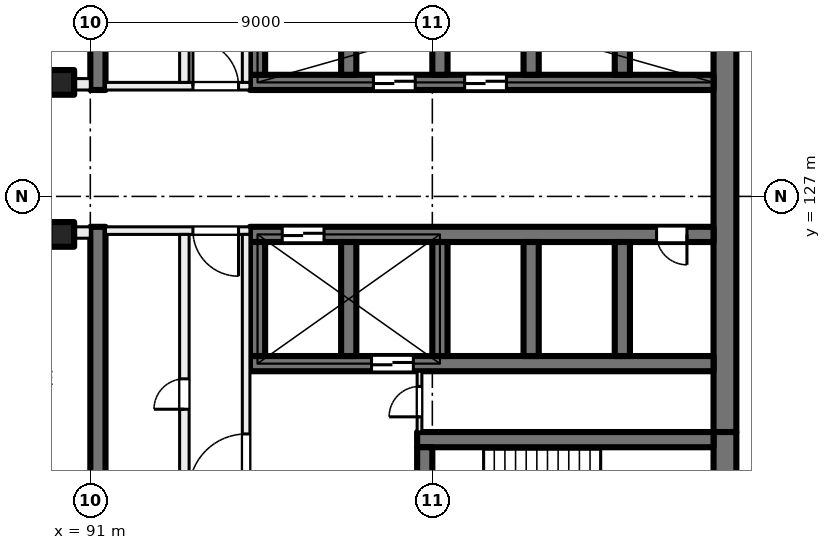
"""IFC4 building model, lengths in metres.
Left out: names, types, materials, properties, quantities, classifications, styles, units other than length and angle.
Written with IfcOpenShell. Run it as: python <this file> out.ifc"""

import sys

from ifc_helpers import new_model, si_unit, direction, frame, frame_2d, origin, origin_2d, place, context, subcontext, project, spatial, rectangle, extrude, element, fill, save


model = new_model("IFC4")
c1 = context("Model", 3, precision=1e-05, world=origin(), true_north=direction((0.0, 1.0)))
c2 = subcontext(c1, "Body", "Model", "MODEL_VIEW")
j1 = project(units=[si_unit("LENGTHUNIT", "METRE"), si_unit("PLANEANGLEUNIT", "RADIAN")], contexts=[c1])
p1 = place(None, origin())
s1 = spatial("IfcSite", under=j1, at=p1, CompositionType="ELEMENT")
p2 = place(p1, origin())
s2 = spatial("IfcBuilding", under=s1, at=p2, CompositionType="ELEMENT")
p3 = place(p2, frame((0.0, 0.0, 101.0)))
s3 = spatial("IfcBuildingStorey", under=s2, at=p3, CompositionType="ELEMENT", Elevation=101.0)
for number, where, z_axis, x_axis in (
    (1, (90.25, 130.0, 0.0), (0.0, 0.0, 1.0), (1.0, 0.0, 0.0)),
    (2, (90.25, 126.0, 0.0), (0.0, 0.0, 1.0), (1.0, 0.0, 0.0)),
):
    element("IfcColumn", number, at=place(p3, frame(where, z_axis=z_axis, x_axis=x_axis)), inside=s3, PredefinedType="COLUMN", context=c2, shape_type="SweptSolid", body=[
        extrude(rectangle(XDim=0.65, YDim=0.65, at=origin_2d()), origin(), (0.0, 0.0, 1.0), 4.0),
    ])
p4 = place(p3, frame((107.7, 135.2, 0.0), z_axis=(0.0, 0.0, 1.0), x_axis=(0.0, -1.0, 0.0)))
e3 = element("IfcWall", 3, at=p4, inside=s3, PredefinedType="SHEAR", context=c2, shape_type="SweptSolid", body=[
    extrude(rectangle(XDim=14.4, YDim=0.6, at=frame_2d((7.2, 0.0))), origin(), (0.0, 0.0, 1.0), 4.0),
])
p5 = place(p3, frame((107.7, 120.8, 0.0), z_axis=(0.0, 0.0, 1.0), x_axis=(0.0, -1.0, 0.0)))
e4 = element("IfcWall", 4, at=p5, inside=s3, PredefinedType="SHEAR", context=c2, shape_type="SweptSolid", body=[
    extrude(rectangle(XDim=3.8, YDim=0.6, at=frame_2d((1.9, 0.0))), origin(), (0.0, 0.0, 1.0), 4.0),
])
p6 = place(p3, frame((107.4, 120.6, 0.0), z_axis=(0.0, 0.0, 1.0), x_axis=(-1.0, 0.0, 0.0)))
e5 = element("IfcWall", 5, at=p6, inside=s3, PredefinedType="SHEAR", context=c2, shape_type="SweptSolid", body=[
    extrude(rectangle(XDim=7.8, YDim=0.4, at=frame_2d((3.9, 0.0))), origin(), (0.0, 0.0, 1.0), 4.0),
])
p7 = place(p3, frame((99.8, 120.4, 0.0), z_axis=(0.0, 0.0, 1.0), x_axis=(0.0, -1.0, 0.0)))
e6 = element("IfcWall", 6, at=p7, inside=s3, PredefinedType="SHEAR", context=c2, shape_type="SweptSolid", body=[
    extrude(rectangle(XDim=2.8, YDim=0.4, at=frame_2d((1.4, 0.0))), origin(), (0.0, 0.0, 1.0), 4.0),
])
p8 = place(p7, frame((0.9, 0.0, 0.0)))
e7 = element("IfcOpeningElement", 7, at=p8, cuts=e6, PredefinedType="OPENING", context=c2, shape_type="SweptSolid", body=[
    extrude(rectangle(XDim=1.0, YDim=2.1, at=frame_2d((0.5, 1.05))), frame((0.0, 0.21, 0.0), z_axis=(0.0, -1.0, 0.0), x_axis=(1.0, 0.0, 0.0)), (0.0, 0.0, 1.0), 0.42),
])
p9 = place(p3, frame((107.4, 130.0, 0.0), z_axis=(0.0, 0.0, 1.0), x_axis=(-1.0, 0.0, 0.0)))
e8 = element("IfcWall", 8, at=p9, inside=s3, PredefinedType="SHEAR", context=c2, shape_type="SweptSolid", body=[
    extrude(rectangle(XDim=12.2, YDim=0.4, at=frame_2d((6.1, 0.0))), origin(), (0.0, 0.0, 1.0), 4.0),
])
p10 = place(p9, frame((5.45, 0.0, 0.0)))
e9 = element("IfcOpeningElement", 9, at=p10, cuts=e8, PredefinedType="OPENING", context=c2, shape_type="SweptSolid", body=[
    extrude(rectangle(XDim=1.1, YDim=2.1, at=frame_2d((0.55, 1.05))), frame((0.0, 0.21, 0.0), z_axis=(0.0, -1.0, 0.0), x_axis=(1.0, 0.0, 0.0)), (0.0, 0.0, 1.0), 0.42),
])
p11 = place(p9, frame((7.85, 0.0, 0.0)))
e10 = element("IfcOpeningElement", 10, at=p11, cuts=e8, PredefinedType="OPENING", context=c2, shape_type="SweptSolid", body=[
    extrude(rectangle(XDim=1.1, YDim=2.1, at=frame_2d((0.55, 1.05))), frame((0.0, 0.21, 0.0), z_axis=(0.0, -1.0, 0.0), x_axis=(1.0, 0.0, 0.0)), (0.0, 0.0, 1.0), 0.42),
])
for number, where, z_axis, x_axis in (
    (11, (105.0, 133.2, 0.0), (0.0, 0.0, 1.0), (0.0, -1.0, 0.0)),
    (12, (102.6, 133.2, 0.0), (0.0, 0.0, 1.0), (0.0, -1.0, 0.0)),
    (13, (100.2, 133.2, 0.0), (0.0, 0.0, 1.0), (0.0, -1.0, 0.0)),
    (14, (97.8, 133.2, 0.0), (0.0, 0.0, 1.0), (0.0, -1.0, 0.0)),
    (15, (95.4, 133.2, 0.0), (0.0, 0.0, 1.0), (0.0, -1.0, 0.0)),
):
    element("IfcWall", number, at=place(p3, frame(where, z_axis=z_axis, x_axis=x_axis)), inside=s3, PredefinedType="SHEAR", context=c2, shape_type="SweptSolid", body=[
        extrude(rectangle(XDim=3.0, YDim=0.4, at=frame_2d((1.5, 0.0))), origin(), (0.0, 0.0, 1.0), 4.0),
    ])
p12 = place(p3, frame((107.4, 126.0, 0.0), z_axis=(0.0, 0.0, 1.0), x_axis=(-1.0, 0.0, 0.0)))
e16 = element("IfcWall", 16, at=p12, inside=s3, PredefinedType="SHEAR", context=c2, shape_type="SweptSolid", body=[
    extrude(rectangle(XDim=12.2, YDim=0.4, at=frame_2d((6.1, 0.0))), origin(), (0.0, 0.0, 1.0), 4.0),
])
p13 = place(p12, frame((10.25, 0.0, 0.0)))
e17 = element("IfcOpeningElement", 17, at=p13, cuts=e16, PredefinedType="OPENING", context=c2, shape_type="SweptSolid", body=[
    extrude(rectangle(XDim=1.1, YDim=2.1, at=frame_2d((0.55, 1.05))), frame((0.0, 0.21, 0.0), z_axis=(0.0, -1.0, 0.0), x_axis=(1.0, 0.0, 0.0)), (0.0, 0.0, 1.0), 0.42),
])
p14 = place(p12, frame((0.7, 0.0, 0.0)))
e18 = element("IfcOpeningElement", 18, at=p14, cuts=e16, PredefinedType="OPENING", context=c2, shape_type="SweptSolid", body=[
    extrude(rectangle(XDim=0.8, YDim=2.1, at=frame_2d((0.4, 1.05))), frame((0.0, 0.21, 0.0), z_axis=(0.0, -1.0, 0.0), x_axis=(1.0, 0.0, 0.0)), (0.0, 0.0, 1.0), 0.42),
])
p15 = place(p3, frame((107.4, 122.6, 0.0), z_axis=(0.0, 0.0, 1.0), x_axis=(-1.0, 0.0, 0.0)))
e19 = element("IfcWall", 19, at=p15, inside=s3, PredefinedType="SHEAR", context=c2, shape_type="SweptSolid", body=[
    extrude(rectangle(XDim=12.2, YDim=0.4, at=frame_2d((6.1, 0.0))), origin(), (0.0, 0.0, 1.0), 4.0),
])
p16 = place(p15, frame((7.9, 0.0, 0.0)))
e20 = element("IfcOpeningElement", 20, at=p16, cuts=e19, PredefinedType="OPENING", context=c2, shape_type="SweptSolid", body=[
    extrude(rectangle(XDim=1.1, YDim=2.1, at=frame_2d((0.55, 1.05))), frame((0.0, 0.21, 0.0), z_axis=(0.0, -1.0, 0.0), x_axis=(1.0, 0.0, 0.0)), (0.0, 0.0, 1.0), 0.42),
])
for number, where, z_axis, x_axis in (
    (21, (105.0, 125.8, 0.0), (0.0, 0.0, 1.0), (0.0, -1.0, 0.0)),
    (22, (102.6, 125.8, 0.0), (0.0, 0.0, 1.0), (0.0, -1.0, 0.0)),
    (23, (100.2, 125.8, 0.0), (0.0, 0.0, 1.0), (0.0, -1.0, 0.0)),
    (24, (97.8, 125.8, 0.0), (0.0, 0.0, 1.0), (0.0, -1.0, 0.0)),
    (25, (95.4, 125.8, 0.0), (0.0, 0.0, 1.0), (0.0, -1.0, 0.0)),
):
    element("IfcWall", number, at=place(p3, frame(where, z_axis=z_axis, x_axis=x_axis)), inside=s3, PredefinedType="SHEAR", context=c2, shape_type="SweptSolid", body=[
        extrude(rectangle(XDim=3.0, YDim=0.4, at=frame_2d((1.5, 0.0))), origin(), (0.0, 0.0, 1.0), 4.0),
    ])
for number, where, z_axis, x_axis in (
    (26, (91.2, 138.4, 0.0), (0.0, 0.0, 1.0), (0.0, -1.0, 0.0)),
    (27, (91.2, 126.2, 0.0), (0.0, 0.0, 1.0), (0.0, -1.0, 0.0)),
):
    element("IfcWall", number, at=place(p3, frame(where, z_axis=z_axis, x_axis=x_axis)), inside=s3, PredefinedType="SHEAR", context=c2, shape_type="SweptSolid", body=[
        extrude(rectangle(XDim=8.6, YDim=0.4, at=frame_2d((4.3, 0.0))), origin(), (0.0, 0.0, 1.0), 4.0),
    ])
p17 = place(p3, frame((95.2, 126.1, 0.0), z_axis=(0.0, 0.0, 1.0), x_axis=(-1.0, 0.0, 0.0)))
e28 = element("IfcWall", 28, at=p17, inside=s3, PredefinedType="PARTITIONING", context=c2, shape_type="SweptSolid", body=[
    extrude(rectangle(XDim=3.8, YDim=0.2, at=frame_2d((1.9, 0.0))), origin(), (0.0, 0.0, 1.0), 3.625),
])
p18 = place(p17, frame((0.3, 0.0, 0.0)))
e29 = element("IfcOpeningElement", 29, at=p18, cuts=e28, PredefinedType="OPENING", context=c2, shape_type="SweptSolid", body=[
    extrude(rectangle(XDim=1.2, YDim=2.1, at=frame_2d((0.6, 1.05))), frame((0.0, 0.11, 0.0), z_axis=(0.0, -1.0, 0.0), x_axis=(1.0, 0.0, 0.0)), (0.0, 0.0, 1.0), 0.22),
])
p19 = place(p3, frame((95.1, 117.6, 0.0), z_axis=(0.0, 0.0, 1.0), x_axis=(0.0, 1.0, 0.0)))
e30 = element("IfcWall", 30, at=p19, inside=s3, PredefinedType="PARTITIONING", context=c2, shape_type="SweptSolid", body=[
    extrude(rectangle(XDim=8.4, YDim=0.2, at=frame_2d((4.2, 0.0))), origin(), (0.0, 0.0, 1.0), 3.625),
])
p20 = place(p19, frame((1.65, 0.0, 0.0)))
e31 = element("IfcOpeningElement", 31, at=p20, cuts=e30, PredefinedType="OPENING", context=c2, shape_type="SweptSolid", body=[
    extrude(rectangle(XDim=1.5, YDim=2.1, at=frame_2d((0.75, 1.05))), frame((0.0, 0.11, 0.0), z_axis=(0.0, -1.0, 0.0), x_axis=(1.0, 0.0, 0.0)), (0.0, 0.0, 1.0), 0.22),
])
p21 = place(p3, frame((93.475, 117.6, 0.0), z_axis=(0.0, 0.0, 1.0), x_axis=(0.0, 1.0, 0.0)))
e32 = element("IfcWall", 32, at=p21, inside=s3, PredefinedType="PARTITIONING", context=c2, shape_type="SweptSolid", body=[
    extrude(rectangle(XDim=8.4, YDim=0.25, at=frame_2d((4.2, 0.0))), origin(), (0.0, 0.0, 1.0), 3.625),
])
p22 = place(p21, frame((3.8, 0.0, 0.0)))
e33 = element("IfcOpeningElement", 33, at=p22, cuts=e32, PredefinedType="OPENING", context=c2, shape_type="SweptSolid", body=[
    extrude(rectangle(XDim=0.8, YDim=2.1, at=frame_2d((0.4, 1.05))), frame((0.0, 0.135, 0.0), z_axis=(0.0, -1.0, 0.0), x_axis=(1.0, 0.0, 0.0)), (0.0, 0.0, 1.0), 0.27),
])
p23 = place(p3, frame((99.663, 120.8, 0.0), z_axis=(0.0, 0.0, 1.0), x_axis=(0.0, 1.0, 0.0)))
e34 = element("IfcWall", 34, at=p23, inside=s3, PredefinedType="PARTITIONING", context=c2, shape_type="SweptSolid", body=[
    extrude(rectangle(XDim=1.6, YDim=0.125, at=frame_2d((0.8, 0.0))), origin(), (0.0, 0.0, 1.0), 3.625),
])
p24 = place(p23, frame((0.4, 0.0, 0.0)))
e35 = element("IfcOpeningElement", 35, at=p24, cuts=e34, PredefinedType="OPENING", context=c2, shape_type="SweptSolid", body=[
    extrude(rectangle(XDim=0.8, YDim=2.1, at=frame_2d((0.4, 1.05))), frame((0.0, 0.073, 0.0), z_axis=(0.0, -1.0, 0.0), x_axis=(1.0, 0.0, 0.0)), (0.0, 0.0, 1.0), 0.145),
])
p25 = place(p3, frame((91.4, 129.9, 0.0), z_axis=(0.0, 0.0, 1.0), x_axis=(1.0, 0.0, 0.0)))
e36 = element("IfcWall", 36, at=p25, inside=s3, PredefinedType="PARTITIONING", context=c2, shape_type="SweptSolid", body=[
    extrude(rectangle(XDim=3.8, YDim=0.2, at=frame_2d((1.9, 0.0))), origin(), (0.0, 0.0, 1.0), 3.625),
])
p26 = place(p25, frame((2.3, 0.0, 0.0)))
e37 = element("IfcOpeningElement", 37, at=p26, cuts=e36, PredefinedType="OPENING", context=c2, shape_type="SweptSolid", body=[
    extrude(rectangle(XDim=1.2, YDim=2.1, at=frame_2d((0.6, 1.05))), frame((0.0, 0.11, 0.0), z_axis=(0.0, -1.0, 0.0), x_axis=(1.0, 0.0, 0.0)), (0.0, 0.0, 1.0), 0.22),
])
p27 = place(p3, frame((95.1, 130.0, 0.0), z_axis=(0.0, 0.0, 1.0), x_axis=(0.0, 1.0, 0.0)))
e38 = element("IfcWall", 38, at=p27, inside=s3, PredefinedType="PARTITIONING", context=c2, shape_type="SweptSolid", body=[
    extrude(rectangle(XDim=8.4, YDim=0.2, at=frame_2d((4.2, 0.0))), origin(), (0.0, 0.0, 1.0), 3.625),
])
p28 = place(p27, frame((5.25, 0.0, 0.0)))
e39 = element("IfcOpeningElement", 39, at=p28, cuts=e38, PredefinedType="OPENING", context=c2, shape_type="SweptSolid", body=[
    extrude(rectangle(XDim=1.5, YDim=2.1, at=frame_2d((0.75, 1.05))), frame((0.0, 0.11, 0.0), z_axis=(0.0, -1.0, 0.0), x_axis=(1.0, 0.0, 0.0)), (0.0, 0.0, 1.0), 0.22),
])
p29 = place(p3, frame((93.475, 130.0, 0.0), z_axis=(0.0, 0.0, 1.0), x_axis=(0.0, 1.0, 0.0)))
e40 = element("IfcWall", 40, at=p29, inside=s3, PredefinedType="PARTITIONING", context=c2, shape_type="SweptSolid", body=[
    extrude(rectangle(XDim=8.4, YDim=0.25, at=frame_2d((4.2, 0.0))), origin(), (0.0, 0.0, 1.0), 3.625),
])
p30 = place(p29, frame((0.975, 0.0, 0.0)))
e41 = element("IfcOpeningElement", 41, at=p30, cuts=e40, PredefinedType="OPENING", context=c2, shape_type="SweptSolid", body=[
    extrude(rectangle(XDim=0.8, YDim=2.1, at=frame_2d((0.4, 1.05))), frame((0.0, 0.135, 0.0), z_axis=(0.0, -1.0, 0.0), x_axis=(1.0, 0.0, 0.0)), (0.0, 0.0, 1.0), 0.27),
])
p31 = place(p29, frame((5.225, 0.0, 0.0)))
e42 = element("IfcOpeningElement", 42, at=p31, cuts=e40, PredefinedType="OPENING", context=c2, shape_type="SweptSolid", body=[
    extrude(rectangle(XDim=0.8, YDim=2.1, at=frame_2d((0.4, 1.05))), frame((0.0, 0.135, 0.0), z_axis=(0.0, -1.0, 0.0), x_axis=(1.0, 0.0, 0.0)), (0.0, 0.0, 1.0), 0.27),
])
p32 = place(p3, frame((72.5, 129.95, 0.0), z_axis=(0.0, 0.0, 1.0), x_axis=(1.0, 0.0, 0.0)))
e43 = element("IfcWall", 43, at=p32, inside=s3, PredefinedType="PARTITIONING", context=c2, shape_type="SweptSolid", body=[
    extrude(rectangle(XDim=18.5, YDim=0.3, at=frame_2d((9.25, 0.0))), origin(), (0.0, 0.0, 1.0), 3.625),
])
p33 = place(p32, frame((15.275, 0.0, 0.0)))
e44 = element("IfcOpeningElement", 44, at=p33, cuts=e43, PredefinedType="OPENING", context=c2, shape_type="SweptSolid", body=[
    extrude(rectangle(XDim=1.2, YDim=2.1, at=frame_2d((0.6, 1.05))), frame((0.0, 0.16, 0.0), z_axis=(0.0, -1.0, 0.0), x_axis=(1.0, 0.0, 0.0)), (0.0, 0.0, 1.0), 0.32),
])
p34 = place(p32, frame((10.4, 0.0, 0.0)))
e45 = element("IfcOpeningElement", 45, at=p34, cuts=e43, PredefinedType="OPENING", context=c2, shape_type="SweptSolid", body=[
    extrude(rectangle(XDim=1.2, YDim=2.1, at=frame_2d((0.6, 1.05))), frame((0.0, 0.16, 0.0), z_axis=(0.0, -1.0, 0.0), x_axis=(1.0, 0.0, 0.0)), (0.0, 0.0, 1.0), 0.32),
])
p35 = place(p32, frame((3.475, 0.0, 0.0)))
e46 = element("IfcOpeningElement", 46, at=p35, cuts=e43, PredefinedType="OPENING", context=c2, shape_type="SweptSolid", body=[
    extrude(rectangle(XDim=1.8, YDim=2.1, at=frame_2d((0.9, 1.05))), frame((0.0, 0.16, 0.0), z_axis=(0.0, -1.0, 0.0), x_axis=(1.0, 0.0, 0.0)), (0.0, 0.0, 1.0), 0.32),
])
p36 = place(p3, frame((91.0, 126.05, 0.0), z_axis=(0.0, 0.0, 1.0), x_axis=(-1.0, 0.0, 0.0)))
e47 = element("IfcWall", 47, at=p36, inside=s3, PredefinedType="PARTITIONING", context=c2, shape_type="SweptSolid", body=[
    extrude(rectangle(XDim=43.785, YDim=0.3, at=frame_2d((21.893, 0.0))), origin(), (0.0, 0.0, 1.0), 3.625),
])
p37 = place(p36, frame((7.85, 0.0, 0.0)))
e48 = element("IfcOpeningElement", 48, at=p37, cuts=e47, PredefinedType="OPENING", context=c2, shape_type="SweptSolid", body=[
    extrude(rectangle(XDim=0.8, YDim=2.1, at=frame_2d((0.4, 1.05))), frame((0.0, 0.16, 0.0), z_axis=(0.0, -1.0, 0.0), x_axis=(1.0, 0.0, 0.0)), (0.0, 0.0, 1.0), 0.32),
])
p38 = place(p36, frame((2.875, 0.0, 0.0)))
e49 = element("IfcOpeningElement", 49, at=p38, cuts=e47, PredefinedType="OPENING", context=c2, shape_type="SweptSolid", body=[
    extrude(rectangle(XDim=1.0, YDim=2.1, at=frame_2d((0.5, 1.05))), frame((0.0, 0.16, 0.0), z_axis=(0.0, -1.0, 0.0), x_axis=(1.0, 0.0, 0.0)), (0.0, 0.0, 1.0), 0.32),
])
p39 = place(p36, frame((15.6, 0.0, 0.0)))
e50 = element("IfcOpeningElement", 50, at=p39, cuts=e47, PredefinedType="OPENING", context=c2, shape_type="SweptSolid", body=[
    extrude(rectangle(XDim=1.8, YDim=2.1, at=frame_2d((0.9, 1.05))), frame((0.0, 0.16, 0.0), z_axis=(0.0, -1.0, 0.0), x_axis=(1.0, 0.0, 0.0)), (0.0, 0.0, 1.0), 0.32),
])
p40 = place(p36, frame((25.0, 0.0, 0.0)))
e51 = element("IfcOpeningElement", 51, at=p40, cuts=e47, PredefinedType="OPENING", context=c2, shape_type="SweptSolid", body=[
    extrude(rectangle(XDim=1.0, YDim=2.1, at=frame_2d((0.5, 1.05))), frame((0.0, 0.16, 0.0), z_axis=(0.0, -1.0, 0.0), x_axis=(1.0, 0.0, 0.0)), (0.0, 0.0, 1.0), 0.32),
])
p41 = place(p36, frame((39.296, 0.0, 0.0)))
e52 = element("IfcOpeningElement", 52, at=p41, cuts=e47, PredefinedType="OPENING", context=c2, shape_type="SweptSolid", body=[
    extrude(rectangle(XDim=1.8, YDim=2.1, at=frame_2d((0.9, 1.05))), frame((0.0, 0.16, 0.0), z_axis=(0.0, -1.0, 0.0), x_axis=(1.0, 0.0, 0.0)), (0.0, 0.0, 1.0), 0.32),
])
p42 = place(p13, origin())
e53 = element("IfcDoor", 53, at=p42, inside=s3, OperationType="DOUBLE_DOOR_SLIDING", PredefinedType="DOOR", context=c2, shape_type="SweptSolid", body=[
    extrude(rectangle(XDim=1.1, YDim=2.1, at=frame_2d((0.55, 1.05))), frame((0.0, 0.025, 0.0), z_axis=(0.0, -1.0, 0.0), x_axis=(1.0, 0.0, 0.0)), (0.0, 0.0, 1.0), 0.05),
])
fill(e17, e53)
p43 = place(p10, origin())
e54 = element("IfcDoor", 54, at=p43, inside=s3, OperationType="DOUBLE_DOOR_SLIDING", PredefinedType="DOOR", context=c2, shape_type="SweptSolid", body=[
    extrude(rectangle(XDim=1.1, YDim=2.1, at=frame_2d((0.55, 1.05))), frame((0.0, 0.025, 0.0), z_axis=(0.0, -1.0, 0.0), x_axis=(1.0, 0.0, 0.0)), (0.0, 0.0, 1.0), 0.05),
])
fill(e9, e54)
p44 = place(p11, origin())
e55 = element("IfcDoor", 55, at=p44, inside=s3, OperationType="DOUBLE_DOOR_SLIDING", PredefinedType="DOOR", context=c2, shape_type="SweptSolid", body=[
    extrude(rectangle(XDim=1.1, YDim=2.1, at=frame_2d((0.55, 1.05))), frame((0.0, 0.025, 0.0), z_axis=(0.0, -1.0, 0.0), x_axis=(1.0, 0.0, 0.0)), (0.0, 0.0, 1.0), 0.05),
])
fill(e10, e55)
p45 = place(p14, origin())
e56 = element("IfcDoor", 56, at=p45, inside=s3, OperationType="SINGLE_SWING_LEFT", PredefinedType="DOOR", context=c2, shape_type="SweptSolid", body=[
    extrude(rectangle(XDim=0.8, YDim=2.1, at=frame_2d((0.4, 1.05))), frame((0.0, 0.025, 0.0), z_axis=(0.0, -1.0, 0.0), x_axis=(1.0, 0.0, 0.0)), (0.0, 0.0, 1.0), 0.05),
])
fill(e18, e56)
p46 = place(p18, origin())
e57 = element("IfcDoor", 57, at=p46, inside=s3, OperationType="DOUBLE_DOOR_SINGLE_SWING", PredefinedType="DOOR", context=c2, shape_type="SweptSolid", body=[
    extrude(rectangle(XDim=1.2, YDim=2.1, at=frame_2d((0.6, 1.05))), frame((0.0, 0.025, 0.0), z_axis=(0.0, -1.0, 0.0), x_axis=(1.0, 0.0, 0.0)), (0.0, 0.0, 1.0), 0.05),
])
fill(e29, e57)
p47 = place(p20, origin())
e58 = element("IfcDoor", 58, at=p47, inside=s3, OperationType="DOUBLE_DOOR_SINGLE_SWING", PredefinedType="DOOR", context=c2, shape_type="SweptSolid", body=[
    extrude(rectangle(XDim=1.5, YDim=2.1, at=frame_2d((0.75, 1.05))), frame((0.0, 0.025, 0.0), z_axis=(0.0, -1.0, 0.0), x_axis=(1.0, 0.0, 0.0)), (0.0, 0.0, 1.0), 0.05),
])
fill(e31, e58)
p48 = place(p24, origin())
e59 = element("IfcDoor", 59, at=p48, inside=s3, OperationType="SINGLE_SWING_RIGHT", PredefinedType="DOOR", context=c2, shape_type="SweptSolid", body=[
    extrude(rectangle(XDim=0.8, YDim=2.1, at=frame_2d((0.4, 1.05))), frame((0.0, 0.025, 0.0), z_axis=(0.0, -1.0, 0.0), x_axis=(1.0, 0.0, 0.0)), (0.0, 0.0, 1.0), 0.05),
])
fill(e35, e59)
p49 = place(p22, origin())
e60 = element("IfcDoor", 60, at=p49, inside=s3, OperationType="SINGLE_SWING_LEFT", PredefinedType="DOOR", context=c2, shape_type="SweptSolid", body=[
    extrude(rectangle(XDim=0.8, YDim=2.1, at=frame_2d((0.4, 1.05))), frame((0.0, 0.025, 0.0), z_axis=(0.0, -1.0, 0.0), x_axis=(1.0, 0.0, 0.0)), (0.0, 0.0, 1.0), 0.05),
])
fill(e33, e60)
p50 = place(p26, origin())
e61 = element("IfcDoor", 61, at=p50, inside=s3, OperationType="DOUBLE_DOOR_SINGLE_SWING", PredefinedType="DOOR", context=c2, shape_type="SweptSolid", body=[
    extrude(rectangle(XDim=1.2, YDim=2.1, at=frame_2d((0.6, 1.05))), frame((0.0, 0.025, 0.0), z_axis=(0.0, -1.0, 0.0), x_axis=(1.0, 0.0, 0.0)), (0.0, 0.0, 1.0), 0.05),
])
fill(e37, e61)
p51 = place(p16, origin())
e62 = element("IfcDoor", 62, at=p51, inside=s3, OperationType="DOUBLE_DOOR_SLIDING", PredefinedType="DOOR", context=c2, shape_type="SweptSolid", body=[
    extrude(rectangle(XDim=1.1, YDim=2.1, at=frame_2d((0.55, 1.05))), frame((0.0, 0.025, 0.0), z_axis=(0.0, -1.0, 0.0), x_axis=(1.0, 0.0, 0.0)), (0.0, 0.0, 1.0), 0.05),
])
fill(e20, e62)
save(model, sys.argv[1])
